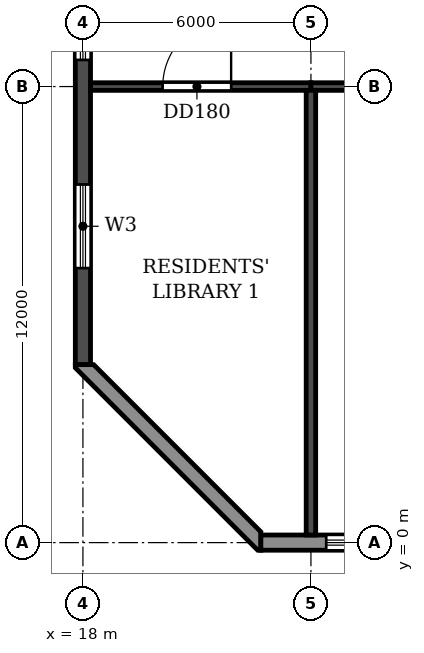
"""IFC4 building model, lengths in metres.
Left out: names, types, materials, properties, quantities, classifications, styles, units other than length and angle.
Written with IfcOpenShell. Run it as: python <this file> out.ifc"""

import sys

from ifc_helpers import new_model, si_unit, direction, frame, frame_2d, origin, place, context, subcontext, project, spatial, polyline, rectangle, outline, extrude, element, fill, save


model = new_model("IFC4")
c1 = context("Model", 3, precision=1e-05, world=origin(), true_north=direction((0.0, 1.0)))
c2 = subcontext(c1, "Body", "Model", "MODEL_VIEW")
j1 = project(units=[si_unit("LENGTHUNIT", "METRE"), si_unit("PLANEANGLEUNIT", "RADIAN")], contexts=[c1])
p1 = place(None, origin())
s1 = spatial("IfcSite", under=j1, at=p1, CompositionType="ELEMENT")
p2 = place(p1, origin())
s2 = spatial("IfcBuilding", under=s1, at=p2, CompositionType="ELEMENT")
p3 = place(p2, frame((0.0, 0.0, 261.0)))
s3 = spatial("IfcBuildingStorey", under=s2, at=p3, CompositionType="ELEMENT", Elevation=261.0)
p4 = place(p3, frame((24.0, 0.2, 0.0), z_axis=(0.0, 0.0, 1.0), x_axis=(0.0, 1.0, 0.0)))
e1 = element("IfcWall", 1, at=p4, inside=s3, PredefinedType="SHEAR", context=c2, shape_type="SweptSolid", body=[
    extrude(rectangle(XDim=11.7, YDim=0.25, at=frame_2d((5.85, 0.0))), origin(), (0.0, 0.0, 1.0), 5.7),
])
p5 = place(p3, frame((18.0, 4.683, 0.0), z_axis=(0.0, 0.0, 1.0), x_axis=(0.0, 1.0, 0.0)))
e2 = element("IfcWall", 2, at=p5, inside=s3, PredefinedType="SHEAR", context=c2, shape_type="SweptSolid", body=[
    extrude(rectangle(XDim=31.834, YDim=0.4, at=frame_2d((15.917, 0.0))), origin(), (0.0, 0.0, 1.0), 5.7),
])
p6 = place(p5, frame((23.817, 0.0, 0.9)))
e3 = element("IfcOpeningElement", 3, at=p6, cuts=e2, PredefinedType="OPENING", context=c2, shape_type="SweptSolid", body=[
    extrude(rectangle(XDim=1.2, YDim=1.5, at=frame_2d((0.6, 0.75))), frame((0.0, 0.21, 0.0), z_axis=(0.0, -1.0, 0.0), x_axis=(1.0, 0.0, 0.0)), (0.0, 0.0, 1.0), 0.42),
])
p7 = place(p5, frame((8.017, 0.0, 0.9)))
e4 = element("IfcOpeningElement", 4, at=p7, cuts=e2, PredefinedType="OPENING", context=c2, shape_type="SweptSolid", body=[
    extrude(rectangle(XDim=1.2, YDim=1.5, at=frame_2d((0.6, 0.75))), frame((0.0, 0.21, 0.0), z_axis=(0.0, -1.0, 0.0), x_axis=(1.0, 0.0, 0.0)), (0.0, 0.0, 1.0), 0.42),
])
p8 = place(p5, frame((27.694, 0.0, 0.6)))
e5 = element("IfcOpeningElement", 5, at=p8, cuts=e2, PredefinedType="OPENING", context=c2, shape_type="SweptSolid", body=[
    extrude(rectangle(XDim=2.2, YDim=1.8, at=frame_2d((1.1, 0.9))), frame((0.0, 0.21, 0.0), z_axis=(0.0, -1.0, 0.0), x_axis=(1.0, 0.0, 0.0)), (0.0, 0.0, 1.0), 0.42),
])
p9 = place(p5, frame((2.541, 0.0, 0.6)))
e6 = element("IfcOpeningElement", 6, at=p9, cuts=e2, PredefinedType="OPENING", context=c2, shape_type="SweptSolid", body=[
    extrude(rectangle(XDim=2.2, YDim=1.8, at=frame_2d((1.1, 0.9))), frame((0.0, 0.21, 0.0), z_axis=(0.0, -1.0, 0.0), x_axis=(1.0, 0.0, 0.0)), (0.0, 0.0, 1.0), 0.42),
])
p10 = place(p5, frame((15.917, 0.0, 0.9)))
e7 = element("IfcOpeningElement", 7, at=p10, cuts=e2, PredefinedType="OPENING", context=c2, shape_type="SweptSolid", body=[
    extrude(rectangle(XDim=1.2, YDim=1.5, at=frame_2d((0.6, 0.75))), frame((0.0, 0.21, 0.0), z_axis=(0.0, -1.0, 0.0), x_axis=(1.0, 0.0, 0.0)), (0.0, 0.0, 1.0), 0.42),
])
p11 = place(p3, frame((18.2, 12.0, 0.0), z_axis=(0.0, 0.0, 1.0), x_axis=(1.0, 0.0, 0.0)))
e8 = element("IfcWall", 8, at=p11, inside=s3, PredefinedType="SHEAR", context=c2, shape_type="SweptSolid", body=[
    extrude(rectangle(XDim=5.8, YDim=0.2, at=frame_2d((2.9, 0.0))), origin(), (0.0, 0.0, 1.0), 5.1),
])
p12 = place(p11, frame((1.9, 0.0, 0.0)))
e9 = element("IfcOpeningElement", 9, at=p12, cuts=e8, PredefinedType="OPENING", context=c2, shape_type="SweptSolid", body=[
    extrude(rectangle(XDim=1.8, YDim=2.1, at=frame_2d((0.9, 1.05))), frame((0.0, 0.11, 0.0), z_axis=(0.0, -1.0, 0.0), x_axis=(1.0, 0.0, 0.0)), (0.0, 0.0, 1.0), 0.22),
])
p13 = place(p3, frame((24.0, 12.0, 0.0), z_axis=(0.0, 0.0, 1.0), x_axis=(1.0, 0.0, 0.0)))
e10 = element("IfcWall", 10, at=p13, inside=s3, PredefinedType="SHEAR", context=c2, shape_type="SweptSolid", body=[
    extrude(rectangle(XDim=6.0, YDim=0.2, at=frame_2d((3.0, 0.0))), origin(), (0.0, 0.0, 1.0), 5.1),
])
p14 = place(p13, frame((2.1, 0.0, 0.0)))
e11 = element("IfcOpeningElement", 11, at=p14, cuts=e10, PredefinedType="OPENING", context=c2, shape_type="SweptSolid", body=[
    extrude(rectangle(XDim=1.8, YDim=2.1, at=frame_2d((0.9, 1.05))), frame((0.0, 0.11, 0.0), z_axis=(0.0, -1.0, 0.0), x_axis=(1.0, 0.0, 0.0)), (0.0, 0.0, 1.0), 0.22),
])
p15 = place(p3, frame((22.683, 0.0, 0.0), z_axis=(0.0, 0.0, 1.0), x_axis=(1.0, 0.0, 0.0)))
e12 = element("IfcWall", 12, at=p15, inside=s3, PredefinedType="STANDARD", context=c2, shape_type="SweptSolid", body=[
    extrude(rectangle(XDim=56.634, YDim=0.4, at=frame_2d((28.317, 0.0))), origin(), (0.0, 0.0, 1.0), 5.7),
])
p16 = place(p15, frame((1.717, 0.0, 0.6)))
e13 = element("IfcOpeningElement", 13, at=p16, cuts=e12, PredefinedType="OPENING", context=c2, shape_type="SweptSolid", body=[
    extrude(rectangle(XDim=2.2, YDim=1.8, at=frame_2d((1.1, 0.9))), frame((0.0, 0.21, 0.0), z_axis=(0.0, -1.0, 0.0), x_axis=(1.0, 0.0, 0.0)), (0.0, 0.0, 1.0), 0.42),
])
p17 = place(p15, frame((4.717, 0.0, 0.6)))
e14 = element("IfcOpeningElement", 14, at=p17, cuts=e12, PredefinedType="OPENING", context=c2, shape_type="SweptSolid", body=[
    extrude(rectangle(XDim=2.2, YDim=1.8, at=frame_2d((1.1, 0.9))), frame((0.0, 0.21, 0.0), z_axis=(0.0, -1.0, 0.0), x_axis=(1.0, 0.0, 0.0)), (0.0, 0.0, 1.0), 0.42),
])
p18 = place(p15, frame((25.717, 0.0, 0.6)))
e15 = element("IfcOpeningElement", 15, at=p18, cuts=e12, PredefinedType="OPENING", context=c2, shape_type="SweptSolid", body=[
    extrude(rectangle(XDim=2.2, YDim=1.8, at=frame_2d((1.1, 0.9))), frame((0.0, 0.21, 0.0), z_axis=(0.0, -1.0, 0.0), x_axis=(1.0, 0.0, 0.0)), (0.0, 0.0, 1.0), 0.42),
])
p19 = place(p15, frame((28.717, 0.0, 0.6)))
e16 = element("IfcOpeningElement", 16, at=p19, cuts=e12, PredefinedType="OPENING", context=c2, shape_type="SweptSolid", body=[
    extrude(rectangle(XDim=2.2, YDim=1.8, at=frame_2d((1.1, 0.9))), frame((0.0, 0.21, 0.0), z_axis=(0.0, -1.0, 0.0), x_axis=(1.0, 0.0, 0.0)), (0.0, 0.0, 1.0), 0.42),
])
p20 = place(p15, frame((31.717, 0.0, 0.6)))
e17 = element("IfcOpeningElement", 17, at=p20, cuts=e12, PredefinedType="OPENING", context=c2, shape_type="SweptSolid", body=[
    extrude(rectangle(XDim=2.2, YDim=1.8, at=frame_2d((1.1, 0.9))), frame((0.0, 0.21, 0.0), z_axis=(0.0, -1.0, 0.0), x_axis=(1.0, 0.0, 0.0)), (0.0, 0.0, 1.0), 0.42),
])
p21 = place(p15, frame((34.717, 0.0, 0.6)))
e18 = element("IfcOpeningElement", 18, at=p21, cuts=e12, PredefinedType="OPENING", context=c2, shape_type="SweptSolid", body=[
    extrude(rectangle(XDim=2.2, YDim=1.8, at=frame_2d((1.1, 0.9))), frame((0.0, 0.21, 0.0), z_axis=(0.0, -1.0, 0.0), x_axis=(1.0, 0.0, 0.0)), (0.0, 0.0, 1.0), 0.42),
])
p22 = place(p15, frame((37.717, 0.0, 0.6)))
e19 = element("IfcOpeningElement", 19, at=p22, cuts=e12, PredefinedType="OPENING", context=c2, shape_type="SweptSolid", body=[
    extrude(rectangle(XDim=2.2, YDim=1.8, at=frame_2d((1.1, 0.9))), frame((0.0, 0.21, 0.0), z_axis=(0.0, -1.0, 0.0), x_axis=(1.0, 0.0, 0.0)), (0.0, 0.0, 1.0), 0.42),
])
p23 = place(p15, frame((40.717, 0.0, 0.6)))
e20 = element("IfcOpeningElement", 20, at=p23, cuts=e12, PredefinedType="OPENING", context=c2, shape_type="SweptSolid", body=[
    extrude(rectangle(XDim=2.2, YDim=1.8, at=frame_2d((1.1, 0.9))), frame((0.0, 0.21, 0.0), z_axis=(0.0, -1.0, 0.0), x_axis=(1.0, 0.0, 0.0)), (0.0, 0.0, 1.0), 0.42),
])
p24 = place(p15, frame((43.717, 0.0, 0.6)))
e21 = element("IfcOpeningElement", 21, at=p24, cuts=e12, PredefinedType="OPENING", context=c2, shape_type="SweptSolid", body=[
    extrude(rectangle(XDim=2.2, YDim=1.8, at=frame_2d((1.1, 0.9))), frame((0.0, 0.21, 0.0), z_axis=(0.0, -1.0, 0.0), x_axis=(1.0, 0.0, 0.0)), (0.0, 0.0, 1.0), 0.42),
])
p25 = place(p15, frame((46.717, 0.0, 0.6)))
e22 = element("IfcOpeningElement", 22, at=p25, cuts=e12, PredefinedType="OPENING", context=c2, shape_type="SweptSolid", body=[
    extrude(rectangle(XDim=2.2, YDim=1.8, at=frame_2d((1.1, 0.9))), frame((0.0, 0.21, 0.0), z_axis=(0.0, -1.0, 0.0), x_axis=(1.0, 0.0, 0.0)), (0.0, 0.0, 1.0), 0.42),
])
p26 = place(p15, frame((49.717, 0.0, 0.6)))
e23 = element("IfcOpeningElement", 23, at=p26, cuts=e12, PredefinedType="OPENING", context=c2, shape_type="SweptSolid", body=[
    extrude(rectangle(XDim=2.2, YDim=1.8, at=frame_2d((1.1, 0.9))), frame((0.0, 0.21, 0.0), z_axis=(0.0, -1.0, 0.0), x_axis=(1.0, 0.0, 0.0)), (0.0, 0.0, 1.0), 0.42),
])
p27 = place(p15, frame((52.717, 0.0, 0.6)))
e24 = element("IfcOpeningElement", 24, at=p27, cuts=e12, PredefinedType="OPENING", context=c2, shape_type="SweptSolid", body=[
    extrude(rectangle(XDim=2.2, YDim=1.8, at=frame_2d((1.1, 0.9))), frame((0.0, 0.21, 0.0), z_axis=(0.0, -1.0, 0.0), x_axis=(1.0, 0.0, 0.0)), (0.0, 0.0, 1.0), 0.42),
])
p28 = place(p3, origin())
e25 = element("IfcWall", 25, at=p28, inside=s3, PredefinedType="STANDARD", context=c2, shape_type="SweptSolid", body=[
    extrude(outline(polyline([(17.8, 4.683), (17.8, 4.6), (22.6, -0.2), (22.683, -0.2), (22.683, 0.283), (18.283, 4.683), (17.8, 4.683)])), origin(), (0.0, 0.0, 1.0), 5.7),
])
p29 = place(p16, origin())
e26 = element("IfcWindow", 26, at=p29, inside=s3, PartitioningType="DOUBLE_PANEL_HORIZONTAL", PredefinedType="WINDOW", context=c2, shape_type="SweptSolid", body=[
    extrude(rectangle(XDim=2.2, YDim=1.8, at=frame_2d((1.1, 0.9))), frame((0.0, 0.03, 0.0), z_axis=(0.0, -1.0, 0.0), x_axis=(1.0, 0.0, 0.0)), (0.0, 0.0, 1.0), 0.06),
])
fill(e13, e26)
p30 = place(p7, origin())
e27 = element("IfcWindow", 27, at=p30, inside=s3, PartitioningType="SINGLE_PANEL", PredefinedType="WINDOW", context=c2, shape_type="SweptSolid", body=[
    extrude(rectangle(XDim=1.2, YDim=1.5, at=frame_2d((0.6, 0.75))), frame((0.0, 0.03, 0.0), z_axis=(0.0, -1.0, 0.0), x_axis=(1.0, 0.0, 0.0)), (0.0, 0.0, 1.0), 0.06),
])
fill(e4, e27)
p31 = place(p9, origin())
e28 = element("IfcWindow", 28, at=p31, inside=s3, PartitioningType="DOUBLE_PANEL_HORIZONTAL", PredefinedType="WINDOW", context=c2, shape_type="SweptSolid", body=[
    extrude(rectangle(XDim=2.2, YDim=1.8, at=frame_2d((1.1, 0.9))), frame((0.0, 0.03, 0.0), z_axis=(0.0, -1.0, 0.0), x_axis=(1.0, 0.0, 0.0)), (0.0, 0.0, 1.0), 0.06),
])
fill(e6, e28)
p32 = place(p12, origin())
e29 = element("IfcDoor", 29, at=p32, inside=s3, OperationType="DOUBLE_DOOR_SINGLE_SWING", PredefinedType="DOOR", context=c2, shape_type="SweptSolid", body=[
    extrude(rectangle(XDim=1.8, YDim=2.1, at=frame_2d((0.9, 1.05))), frame((0.0, 0.025, 0.0), z_axis=(0.0, -1.0, 0.0), x_axis=(1.0, 0.0, 0.0)), (0.0, 0.0, 1.0), 0.05),
])
fill(e9, e29)
save(model, sys.argv[1])
